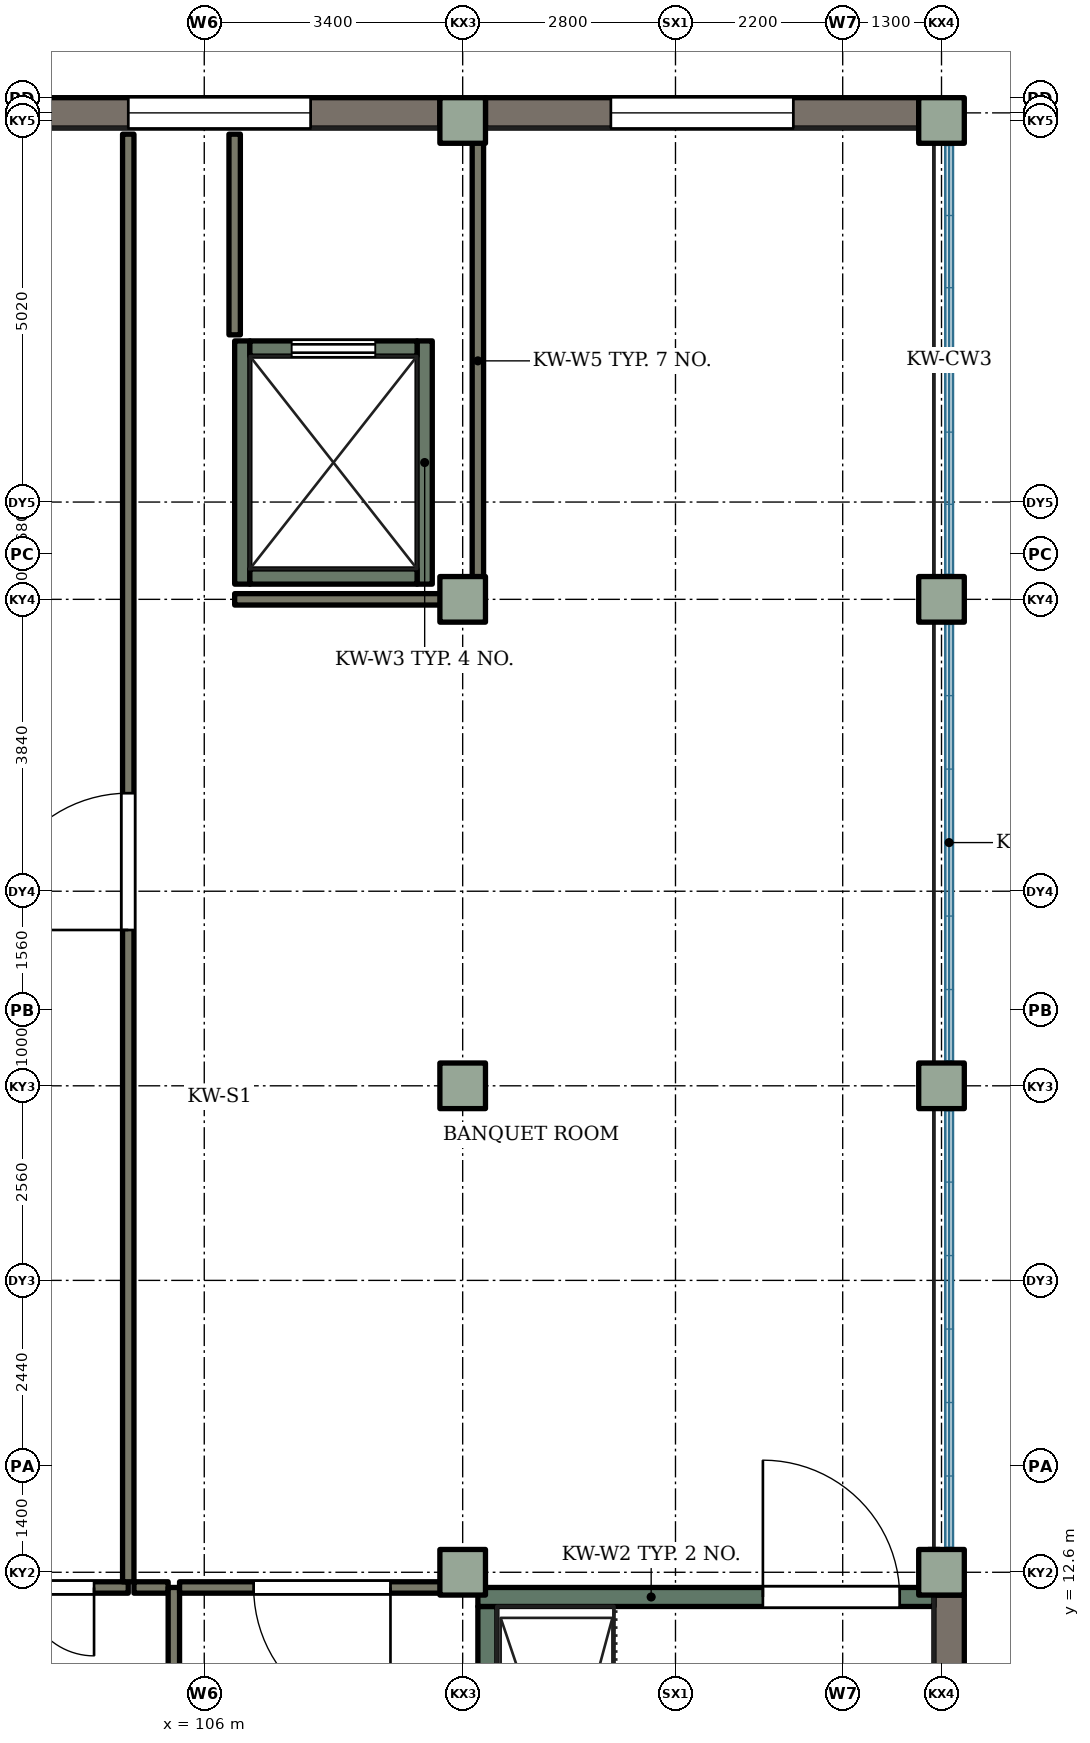
"""IFC4 building model, lengths in metres.
Left out: names, types, materials, properties, quantities, classifications, styles, units other than length and angle.
Written with IfcOpenShell. Run it as: python <this file> out.ifc"""

import sys

from ifc_helpers import new_model, si_unit, direction, frame, frame_2d, origin, origin_2d, place, context, subcontext, project, spatial, rectangle, extrude, element, fill, save


model = new_model("IFC4")
c1 = context("Model", 3, precision=1e-05, world=origin(), true_north=direction((0.0, 1.0)))
c2 = subcontext(c1, "Body", "Model", "MODEL_VIEW")
j1 = project(units=[si_unit("LENGTHUNIT", "METRE"), si_unit("PLANEANGLEUNIT", "RADIAN")], contexts=[c1])
p1 = place(None, origin())
s1 = spatial("IfcSite", under=j1, at=p1, CompositionType="ELEMENT")
p2 = place(p1, origin())
s2 = spatial("IfcBuilding", under=s1, at=p2, CompositionType="ELEMENT")
p3 = place(p2, frame((0.0, 0.0, 4.2)))
s3 = spatial("IfcBuildingStorey", under=s2, at=p3, CompositionType="ELEMENT", Elevation=4.2)
for number, where, z_axis, x_axis in (
    (1, (109.4, 12.6, 0.0), (0.0, 0.0, 1.0), (1.0, 0.0, 0.0)),
    (2, (109.4, 19.0, 0.0), (0.0, 0.0, 1.0), (1.0, 0.0, 0.0)),
    (3, (109.4, 25.4, 0.0), (0.0, 0.0, 1.0), (1.0, 0.0, 0.0)),
    (4, (109.4, 31.7, 0.0), (0.0, 0.0, 1.0), (1.0, 0.0, 0.0)),
    (5, (115.7, 12.6, 0.0), (0.0, 0.0, 1.0), (1.0, 0.0, 0.0)),
    (6, (115.7, 19.0, 0.0), (0.0, 0.0, 1.0), (1.0, 0.0, 0.0)),
    (7, (115.7, 25.4, 0.0), (0.0, 0.0, 1.0), (1.0, 0.0, 0.0)),
    (8, (115.7, 31.7, 0.0), (0.0, 0.0, 1.0), (1.0, 0.0, 0.0)),
):
    element("IfcColumn", number, at=place(p3, frame(where, z_axis=z_axis, x_axis=x_axis)), inside=s3, PredefinedType="COLUMN", context=c2, shape_type="SweptSolid", body=[
        extrude(rectangle(XDim=0.6, YDim=0.6, at=origin_2d()), origin(), (0.0, 0.0, 1.0), 4.2),
    ])
p4 = place(p3, frame((103.3, 31.8, 0.0), z_axis=(0.0, 0.0, 1.0), x_axis=(1.0, 0.0, 0.0)))
e9 = element("IfcWall", 9, at=p4, inside=s3, PredefinedType="SOLIDWALL", context=c2, shape_type="SweptSolid", body=[
    extrude(rectangle(XDim=5.8, YDim=0.4, at=frame_2d((2.9, 0.0))), origin(), (0.0, 0.0, 1.0), 4.2),
])
p5 = place(p4, frame((1.7, 0.0, 0.9)))
e10 = element("IfcOpeningElement", 10, at=p5, cuts=e9, PredefinedType="OPENING", context=c2, shape_type="SweptSolid", body=[
    extrude(rectangle(XDim=2.4, YDim=2.7, at=frame_2d((1.2, 1.35))), frame((0.0, 0.21, 0.0), z_axis=(0.0, -1.0, 0.0), x_axis=(1.0, 0.0, 0.0)), (0.0, 0.0, 1.0), 0.42),
])
p6 = place(p3, frame((109.7, 31.8, 0.0), z_axis=(0.0, 0.0, 1.0), x_axis=(1.0, 0.0, 0.0)))
e11 = element("IfcWall", 11, at=p6, inside=s3, PredefinedType="SOLIDWALL", context=c2, shape_type="SweptSolid", body=[
    extrude(rectangle(XDim=5.7, YDim=0.4, at=frame_2d((2.85, 0.0))), origin(), (0.0, 0.0, 1.0), 4.2),
])
p7 = place(p6, frame((1.65, 0.0, 0.9)))
e12 = element("IfcOpeningElement", 12, at=p7, cuts=e11, PredefinedType="OPENING", context=c2, shape_type="SweptSolid", body=[
    extrude(rectangle(XDim=2.4, YDim=2.7, at=frame_2d((1.2, 1.35))), frame((0.0, 0.21, 0.0), z_axis=(0.0, -1.0, 0.0), x_axis=(1.0, 0.0, 0.0)), (0.0, 0.0, 1.0), 0.42),
])
p8 = place(p3, frame((115.8, 12.3, 0.0), z_axis=(0.0, 0.0, 1.0), x_axis=(0.0, -1.0, 0.0)))
e13 = element("IfcWall", 13, at=p8, inside=s3, PredefinedType="SOLIDWALL", context=c2, shape_type="SweptSolid", body=[
    extrude(rectangle(XDim=5.7, YDim=0.4, at=frame_2d((2.85, 0.0))), origin(), (0.0, 0.0, 1.0), 4.2),
])
p9 = place(p8, frame((2.35, 0.0, 0.9)))
e14 = element("IfcOpeningElement", 14, at=p9, cuts=e13, PredefinedType="OPENING", context=c2, shape_type="SweptSolid", body=[
    extrude(rectangle(XDim=1.0, YDim=1.5, at=frame_2d((0.5, 0.75))), frame((0.0, 0.21, 0.0), z_axis=(0.0, -1.0, 0.0), x_axis=(1.0, 0.0, 0.0)), (0.0, 0.0, 1.0), 0.42),
])
p10 = place(p3, frame((109.725, 6.4, 0.0), z_axis=(0.0, 0.0, 1.0), x_axis=(0.0, 1.0, 0.0)))
e15 = element("IfcWall", 15, at=p10, inside=s3, PredefinedType="SHEAR", context=c2, shape_type="SweptSolid", body=[
    extrude(rectangle(XDim=5.75, YDim=0.25, at=frame_2d((2.875, 0.0))), origin(), (0.0, 0.0, 1.0), 4.2),
])
p11 = place(p3, frame((109.6, 12.275, 0.0), z_axis=(0.0, 0.0, 1.0), x_axis=(1.0, 0.0, 0.0)))
e16 = element("IfcWall", 16, at=p11, inside=s3, PredefinedType="SHEAR", context=c2, shape_type="SweptSolid", body=[
    extrude(rectangle(XDim=6.0, YDim=0.25, at=frame_2d((3.0, 0.0))), origin(), (0.0, 0.0, 1.0), 4.2),
])
p12 = place(p11, frame((3.75, 0.0, 0.0)))
e17 = element("IfcOpeningElement", 17, at=p12, cuts=e16, PredefinedType="OPENING", context=c2, shape_type="SweptSolid", body=[
    extrude(rectangle(XDim=1.8, YDim=2.1, at=frame_2d((0.9, 1.05))), frame((0.0, 0.135, 0.0), z_axis=(0.0, -1.0, 0.0), x_axis=(1.0, 0.0, 0.0)), (0.0, 0.0, 1.0), 0.27),
])
for number, where, z_axis, x_axis in (
    (18, (106.5, 25.6, 0.0), (0.0, 0.0, 1.0), (0.0, 1.0, 0.0)),
    (19, (108.9, 25.6, 0.0), (0.0, 0.0, 1.0), (0.0, 1.0, 0.0)),
):
    element("IfcWall", number, at=place(p3, frame(where, z_axis=z_axis, x_axis=x_axis)), inside=s3, PredefinedType="SHEAR", context=c2, shape_type="SweptSolid", body=[
        extrude(rectangle(XDim=3.2, YDim=0.2, at=frame_2d((1.6, 0.0))), origin(), (0.0, 0.0, 1.0), 4.2),
    ])
p13 = place(p3, frame((106.6, 25.7, 0.0), z_axis=(0.0, 0.0, 1.0), x_axis=(1.0, 0.0, 0.0)))
e20 = element("IfcWall", 20, at=p13, inside=s3, PredefinedType="SHEAR", context=c2, shape_type="SweptSolid", body=[
    extrude(rectangle(XDim=2.2, YDim=0.2, at=frame_2d((1.1, 0.0))), origin(), (0.0, 0.0, 1.0), 4.2),
])
p14 = place(p3, frame((106.6, 28.7, 0.0), z_axis=(0.0, 0.0, 1.0), x_axis=(1.0, 0.0, 0.0)))
e21 = element("IfcWall", 21, at=p14, inside=s3, PredefinedType="SHEAR", context=c2, shape_type="SweptSolid", body=[
    extrude(rectangle(XDim=2.2, YDim=0.2, at=frame_2d((1.1, 0.0))), origin(), (0.0, 0.0, 1.0), 4.2),
])
p15 = place(p14, frame((0.55, 0.0, 0.0)))
e22 = element("IfcOpeningElement", 22, at=p15, cuts=e21, PredefinedType="OPENING", context=c2, shape_type="SweptSolid", body=[
    extrude(rectangle(XDim=1.1, YDim=2.1, at=frame_2d((0.55, 1.05))), frame((0.0, 0.11, 0.0), z_axis=(0.0, -1.0, 0.0), x_axis=(1.0, 0.0, 0.0)), (0.0, 0.0, 1.0), 0.22),
])
p16 = place(p3, frame((105.0, 12.4, 0.0), z_axis=(0.0, 0.0, 1.0), x_axis=(-1.0, 0.0, 0.0)))
e23 = element("IfcWall", 23, at=p16, inside=s3, PredefinedType="PARTITIONING", context=c2, shape_type="SweptSolid", body=[
    extrude(rectangle(XDim=1.725, YDim=0.15, at=frame_2d((0.863, 0.0))), origin(), (0.0, 0.0, 1.0), 3.92),
])
p17 = place(p16, frame((0.45, 0.0, 0.0)))
e24 = element("IfcOpeningElement", 24, at=p17, cuts=e23, PredefinedType="OPENING", context=c2, shape_type="SweptSolid", body=[
    extrude(rectangle(XDim=0.9, YDim=2.1, at=frame_2d((0.45, 1.05))), frame((0.0, 0.085, 0.0), z_axis=(0.0, -1.0, 0.0), x_axis=(1.0, 0.0, 0.0)), (0.0, 0.0, 1.0), 0.17),
])
p18 = place(p3, frame((105.0, 12.475, 0.0), z_axis=(0.0, 0.0, 1.0), x_axis=(0.0, 1.0, 0.0)))
e25 = element("IfcWall", 25, at=p18, inside=s3, PredefinedType="PARTITIONING", context=c2, shape_type="SweptSolid", body=[
    extrude(rectangle(XDim=19.045, YDim=0.15, at=frame_2d((9.522, 0.0))), origin(), (0.0, 0.0, 1.0), 3.92),
])
p19 = place(p18, frame((8.575, 0.0, 0.0)))
e26 = element("IfcOpeningElement", 26, at=p19, cuts=e25, PredefinedType="OPENING", context=c2, shape_type="SweptSolid", body=[
    extrude(rectangle(XDim=1.8, YDim=2.1, at=frame_2d((0.9, 1.05))), frame((0.0, 0.085, 0.0), z_axis=(0.0, -1.0, 0.0), x_axis=(1.0, 0.0, 0.0)), (0.0, 0.0, 1.0), 0.17),
])
p20 = place(p3, frame((105.525, 12.4, 0.0), z_axis=(0.0, 0.0, 1.0), x_axis=(-1.0, 0.0, 0.0)))
e27 = element("IfcWall", 27, at=p20, inside=s3, PredefinedType="PARTITIONING", context=c2, shape_type="SweptSolid", body=[
    extrude(rectangle(XDim=0.45, YDim=0.15, at=frame_2d((0.225, 0.0))), origin(), (0.0, 0.0, 1.0), 3.92),
])
p21 = place(p3, frame((105.6, 6.48, 0.0), z_axis=(0.0, 0.0, 1.0), x_axis=(0.0, 1.0, 0.0)))
e28 = element("IfcWall", 28, at=p21, inside=s3, PredefinedType="PARTITIONING", context=c2, shape_type="SweptSolid", body=[
    extrude(rectangle(XDim=5.92, YDim=0.15, at=frame_2d((2.96, 0.0))), origin(), (0.0, 0.0, 1.0), 3.92),
])
p22 = place(p3, frame((106.4, 25.4, 0.0), z_axis=(0.0, 0.0, 1.0), x_axis=(1.0, 0.0, 0.0)))
e29 = element("IfcWall", 29, at=p22, inside=s3, PredefinedType="PARTITIONING", context=c2, shape_type="SweptSolid", body=[
    extrude(rectangle(XDim=3.2, YDim=0.15, at=frame_2d((1.6, 0.0))), origin(), (0.0, 0.0, 1.0), 3.92),
])
p23 = place(p3, frame((106.4, 31.52, 0.0), z_axis=(0.0, 0.0, 1.0), x_axis=(0.0, -1.0, 0.0)))
e30 = element("IfcWall", 30, at=p23, inside=s3, PredefinedType="PARTITIONING", context=c2, shape_type="SweptSolid", body=[
    extrude(rectangle(XDim=2.64, YDim=0.15, at=frame_2d((1.32, 0.0))), origin(), (0.0, 0.0, 1.0), 3.92),
])
p24 = place(p3, frame((109.52, 12.4, 0.0), z_axis=(0.0, 0.0, 1.0), x_axis=(-1.0, 0.0, 0.0)))
e31 = element("IfcWall", 31, at=p24, inside=s3, PredefinedType="PARTITIONING", context=c2, shape_type="SweptSolid", body=[
    extrude(rectangle(XDim=3.845, YDim=0.15, at=frame_2d((1.922, 0.0))), origin(), (0.0, 0.0, 1.0), 3.92),
])
p25 = place(p24, frame((1.07, 0.0, 0.0)))
e32 = element("IfcOpeningElement", 32, at=p25, cuts=e31, PredefinedType="OPENING", context=c2, shape_type="SweptSolid", body=[
    extrude(rectangle(XDim=1.8, YDim=2.1, at=frame_2d((0.9, 1.05))), frame((0.0, 0.085, 0.0), z_axis=(0.0, -1.0, 0.0), x_axis=(1.0, 0.0, 0.0)), (0.0, 0.0, 1.0), 0.17),
])
p26 = place(p3, frame((109.525, 31.6, 0.0), z_axis=(0.0, 0.0, 1.0), x_axis=(-1.0, 0.0, 0.0)))
e33 = element("IfcWall", 33, at=p26, inside=s3, PredefinedType="PARTITIONING", context=c2, shape_type="SweptSolid", body=[
    extrude(rectangle(XDim=0.345, YDim=0.15, at=frame_2d((0.172, 0.0))), origin(), (0.0, 0.0, 1.0), 3.92),
])
p27 = place(p3, frame((109.6, 25.475, 0.0), z_axis=(0.0, 0.0, 1.0), x_axis=(0.0, 1.0, 0.0)))
e34 = element("IfcWall", 34, at=p27, inside=s3, PredefinedType="PARTITIONING", context=c2, shape_type="SweptSolid", body=[
    extrude(rectangle(XDim=6.125, YDim=0.15, at=frame_2d((3.062, 0.0))), origin(), (0.0, 0.0, 1.0), 3.92),
])
p28 = place(p3, frame((115.6, 12.9, 0.0), z_axis=(0.0, 0.0, 1.0), x_axis=(0.0, -1.0, 0.0)))
e35 = element("IfcWall", 35, at=p28, inside=s3, PredefinedType="PARTITIONING", context=c2, shape_type="SweptSolid", body=[
    extrude(rectangle(XDim=0.42, YDim=0.15, at=frame_2d((0.21, 0.0))), origin(), (0.0, 0.0, 1.0), 3.92),
])
p29 = place(p5, origin())
e36 = element("IfcWindow", 36, at=p29, inside=s3, PartitioningType="SINGLE_PANEL", PredefinedType="WINDOW", context=c2, shape_type="SweptSolid", body=[
    extrude(rectangle(XDim=2.4, YDim=2.7, at=frame_2d((1.2, 1.35))), frame((0.0, 0.03, 0.0), z_axis=(0.0, -1.0, 0.0), x_axis=(1.0, 0.0, 0.0)), (0.0, 0.0, 1.0), 0.06),
])
fill(e10, e36)
p30 = place(p7, origin())
e37 = element("IfcWindow", 37, at=p30, inside=s3, PartitioningType="SINGLE_PANEL", PredefinedType="WINDOW", context=c2, shape_type="SweptSolid", body=[
    extrude(rectangle(XDim=2.4, YDim=2.7, at=frame_2d((1.2, 1.35))), frame((0.0, 0.03, 0.0), z_axis=(0.0, -1.0, 0.0), x_axis=(1.0, 0.0, 0.0)), (0.0, 0.0, 1.0), 0.06),
])
fill(e12, e37)
p31 = place(p15, origin())
e38 = element("IfcDoor", 38, at=p31, inside=s3, OperationType="SLIDING_TO_LEFT", PredefinedType="DOOR", context=c2, shape_type="SweptSolid", body=[
    extrude(rectangle(XDim=1.1, YDim=2.1, at=frame_2d((0.55, 1.05))), frame((0.0, 0.025, 0.0), z_axis=(0.0, -1.0, 0.0), x_axis=(1.0, 0.0, 0.0)), (0.0, 0.0, 1.0), 0.05),
])
fill(e22, e38)
p32 = place(p17, origin())
e39 = element("IfcDoor", 39, at=p32, inside=s3, OperationType="SINGLE_SWING_LEFT", PredefinedType="DOOR", context=c2, shape_type="SweptSolid", body=[
    extrude(rectangle(XDim=0.9, YDim=2.1, at=frame_2d((0.45, 1.05))), frame((0.0, 0.025, 0.0), z_axis=(0.0, -1.0, 0.0), x_axis=(1.0, 0.0, 0.0)), (0.0, 0.0, 1.0), 0.05),
])
fill(e24, e39)
p33 = place(p25, origin())
e40 = element("IfcDoor", 40, at=p33, inside=s3, OperationType="DOUBLE_DOOR_SINGLE_SWING", PredefinedType="DOOR", context=c2, shape_type="SweptSolid", body=[
    extrude(rectangle(XDim=1.8, YDim=2.1, at=frame_2d((0.9, 1.05))), frame((0.0, 0.025, 0.0), z_axis=(0.0, -1.0, 0.0), x_axis=(1.0, 0.0, 0.0)), (0.0, 0.0, 1.0), 0.05),
])
fill(e32, e40)
p34 = place(p19, origin())
e41 = element("IfcDoor", 41, at=p34, inside=s3, OperationType="DOUBLE_DOOR_SINGLE_SWING", PredefinedType="DOOR", context=c2, shape_type="SweptSolid", body=[
    extrude(rectangle(XDim=1.8, YDim=2.1, at=frame_2d((0.9, 1.05))), frame((0.0, 0.025, 0.0), z_axis=(0.0, -1.0, 0.0), x_axis=(1.0, 0.0, 0.0)), (0.0, 0.0, 1.0), 0.05),
])
fill(e26, e41)
p35 = place(p12, origin())
e42 = element("IfcDoor", 42, at=p35, inside=s3, OperationType="DOUBLE_DOOR_SINGLE_SWING", PredefinedType="DOOR", context=c2, shape_type="SweptSolid", body=[
    extrude(rectangle(XDim=1.8, YDim=2.1, at=frame_2d((0.9, 1.05))), frame((0.0, 0.025, 0.0), z_axis=(0.0, -1.0, 0.0), x_axis=(1.0, 0.0, 0.0)), (0.0, 0.0, 1.0), 0.05),
])
fill(e17, e42)
save(model, sys.argv[1])
